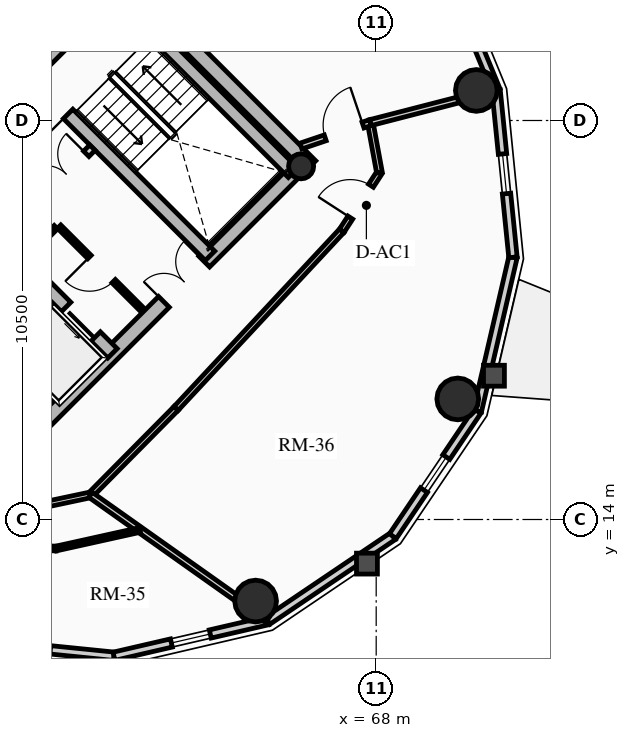
"""IFC4 building model, lengths in metres.
Left out: names, types, materials, properties, quantities, classifications, styles, units other than length and angle.
Written with IfcOpenShell. Run it as: python <this file> out.ifc"""

import sys

from ifc_helpers import new_model, si_unit, direction, frame, frame_2d, origin, origin_2d, place, context, subcontext, project, spatial, rectangle, circle, hollow_circle, extrude, source, transform, mapped, element, fill, save


model = new_model("IFC4")
c1 = context("Model", 3, precision=1e-05, world=origin(), true_north=direction((0.0, 1.0)))
c2 = subcontext(c1, "Body", "Model", "MODEL_VIEW")
j1 = project(units=[si_unit("LENGTHUNIT", "METRE"), si_unit("PLANEANGLEUNIT", "RADIAN")], contexts=[c1])
p1 = place(None, origin())
s1 = spatial("IfcSite", under=j1, at=p1, CompositionType="ELEMENT")
p2 = place(p1, origin())
s2 = spatial("IfcBuilding", under=s1, at=p2, CompositionType="ELEMENT")
p3 = place(p2, frame((0.0, 0.0, 222.85)))
s3 = spatial("IfcBuildingStorey", under=s2, at=p3, CompositionType="ELEMENT", Elevation=222.85)
p4 = place(p3, frame((66.268, 23.298, 0.0), z_axis=(0.0, 0.0, 1.0), x_axis=(-0.707106781187, 0.707106781187, 0.0)))
e1 = element("IfcWall", 1, at=p4, inside=s3, PredefinedType="SHEAR", context=c2, shape_type="SweptSolid", body=[
    extrude(rectangle(XDim=14.1, YDim=0.4, at=frame_2d((7.05, 0.0))), origin(), (0.0, 0.0, 1.0), 3.2),
])
p5 = place(p3, frame((58.561, 15.873, 0.0), z_axis=(0.0, 0.0, 1.0), x_axis=(0.707106781187, 0.707106781187, 0.0)))
e2 = element("IfcWall", 2, at=p5, inside=s3, PredefinedType="SHEAR", context=c2, shape_type="SweptSolid", body=[
    extrude(rectangle(XDim=10.7, YDim=0.4, at=frame_2d((5.35, 0.0))), origin(), (0.0, 0.0, 1.0), 3.2),
])
m1 = source(origin(), c2, "Body", "SweptSolid", [
    extrude(rectangle(XDim=1.5, YDim=2.02, at=frame_2d((0.75, 1.01))), frame((0.0, 0.21, 0.0), z_axis=(0.0, -1.0, 0.0), x_axis=(1.0, 0.0, 0.0)), (0.0, 0.0, 1.0), 0.42),
])
p6 = place(p5, frame((5.45, 0.0, 0.0)))
e3 = element("IfcOpeningElement", 3, at=p6, cuts=e2, PredefinedType="OPENING", context=c2, shape_type="MappedRepresentation", body=[
    mapped(m1, transform((0.0, 0.0, 0.0), x_axis=(1.0, 0.0, 0.0), y_axis=(0.0, 1.0, 0.0), z_axis=(0.0, 0.0, 1.0), scale=1.0)),
])
p7 = place(p3, frame((61.06, 18.373, 0.0), z_axis=(0.0, 0.0, 1.0), x_axis=(-0.707106781187, 0.707106781187, 0.0)))
e4 = element("IfcWall", 4, at=p7, inside=s3, PredefinedType="SHEAR", context=c2, shape_type="SweptSolid", body=[
    extrude(rectangle(XDim=13.7, YDim=0.35, at=frame_2d((6.85, 0.0))), origin(), (0.0, 0.0, 1.0), 3.2),
])
m2 = source(origin(), c2, "Body", "SweptSolid", [
    extrude(rectangle(XDim=1.1, YDim=2.015, at=frame_2d((0.55, 1.007))), frame((0.0, 0.185, 0.0), z_axis=(0.0, -1.0, 0.0), x_axis=(1.0, 0.0, 0.0)), (0.0, 0.0, 1.0), 0.37),
])
p8 = place(p7, frame((4.85, 0.0, 0.0)))
e5 = element("IfcOpeningElement", 5, at=p8, cuts=e4, PredefinedType="OPENING", context=c2, shape_type="MappedRepresentation", body=[
    mapped(m2, transform((0.0, 0.0, 0.0), x_axis=(1.0, 0.0, 0.0), y_axis=(0.0, 1.0, 0.0), z_axis=(0.0, 0.0, 1.0), scale=1.0)),
])
p9 = place(p7, frame((0.625, 0.0, 0.0)))
e6 = element("IfcOpeningElement", 6, at=p9, cuts=e4, PredefinedType="OPENING", context=c2, shape_type="MappedRepresentation", body=[
    mapped(m2, transform((0.0, 0.0, 0.0), x_axis=(1.0, 0.0, 0.0), y_axis=(0.0, 1.0, 0.0), z_axis=(0.0, 0.0, 1.0), scale=1.0)),
])
p10 = place(p7, frame((2.625, 0.0, 0.0)))
e7 = element("IfcOpeningElement", 7, at=p10, cuts=e4, PredefinedType="OPENING", context=c2, shape_type="MappedRepresentation", body=[
    mapped(m2, transform((0.0, 0.0, 0.0), x_axis=(1.0, 0.0, 0.0), y_axis=(0.0, 1.0, 0.0), z_axis=(0.0, 0.0, 1.0), scale=1.0)),
])
m3 = source(origin(), c2, "Body", "SweptSolid", [
    extrude(rectangle(XDim=1.15, YDim=2.02, at=frame_2d((0.575, 1.01))), frame((0.0, 0.185, 0.0), z_axis=(0.0, -1.0, 0.0), x_axis=(1.0, 0.0, 0.0)), (0.0, 0.0, 1.0), 0.37),
])
p11 = place(p7, frame((7.27, 0.0, 0.0)))
e8 = element("IfcOpeningElement", 8, at=p11, cuts=e4, PredefinedType="OPENING", context=c2, shape_type="MappedRepresentation", body=[
    mapped(m3, transform((0.0, 0.0, 0.0), x_axis=(1.0, 0.0, 0.0), y_axis=(0.0, 1.0, 0.0), z_axis=(0.0, 0.0, 1.0), scale=1.0)),
])
p12 = place(p3, frame((63.627, 20.94, 0.0), z_axis=(0.0, 0.0, 1.0), x_axis=(-0.707119496762, 0.707094065383, 0.0)))
e9 = element("IfcWall", 9, at=p12, inside=s3, PredefinedType="SHEAR", context=c2, shape_type="SweptSolid", body=[
    extrude(rectangle(XDim=9.6, YDim=0.35, at=frame_2d((4.8, 0.0))), origin(), (0.0, 0.0, 1.0), 3.2),
])
p13 = place(p12, frame((5.28, 0.0, 0.0)))
e10 = element("IfcOpeningElement", 10, at=p13, cuts=e9, PredefinedType="OPENING", context=c2, shape_type="MappedRepresentation", body=[
    mapped(m3, transform((0.0, 0.0, 0.0), x_axis=(1.0, 0.0, 0.0), y_axis=(0.0, 1.0, 0.0), z_axis=(0.0, 0.0, 1.0), scale=1.0)),
])
p14 = place(p3, frame((65.812, 23.125, 0.0), z_axis=(0.0, 0.0, 1.0), x_axis=(-0.707106781187, 0.707106781187, 0.0)))
e11 = element("IfcWall", 11, at=p14, inside=s3, PredefinedType="SHEAR", context=c2, shape_type="SweptSolid", body=[
    extrude(rectangle(XDim=6.695, YDim=0.35, at=frame_2d((3.348, 0.0))), origin(), (0.0, 0.0, 1.0), 3.2),
])
p15 = place(p3, frame((58.893, 25.674, 0.0), z_axis=(0.0, 0.0, 1.0), x_axis=(0.707106781187, 0.707106781187, 0.0)))
e12 = element("IfcWall", 12, at=p15, inside=s3, PredefinedType="SHEAR", context=c2, shape_type="SweptSolid", body=[
    extrude(rectangle(XDim=3.285, YDim=0.35, at=frame_2d((1.643, 0.0))), origin(), (0.0, 0.0, 1.0), 3.2),
])
p16 = place(p3, frame((66.024, 23.294, 0.0), z_axis=(0.0, 0.0, 1.0), x_axis=(0.707106781187, 0.707106781187, 0.0)))
e13 = element("IfcColumn", 13, at=p16, inside=s3, PredefinedType="COLUMN", context=c2, shape_type="SweptSolid", body=[
    extrude(hollow_circle(Radius=0.33, WallThickness=0.025, at=origin_2d()), origin(), (0.0, 0.0, 1.0), 3.2),
])
for number, where, z_axis, x_axis in (
    (14, (64.827, 11.854, 0.0), (0.0, 0.0, 1.0), (1.0, 0.0, 0.0)),
    (15, (70.146, 17.173, 0.0), (0.0, 0.0, 1.0), (1.0, 0.0, 0.0)),
    (16, (70.635, 25.291, 0.0), (0.0, 0.0, 1.0), (1.0, 0.0, 0.0)),
):
    element("IfcColumn", number, at=place(p3, frame(where, z_axis=z_axis, x_axis=x_axis)), inside=s3, PredefinedType="USERDEFINED", context=c2, shape_type="SweptSolid", body=[
        extrude(circle(Radius=0.55, at=origin_2d()), origin(), (0.0, 0.0, 1.0), 3.2),
    ])
p17 = place(p3, frame((61.1, 10.401, 0.0), z_axis=(0.0, 0.0, 1.0), x_axis=(-0.994929930991, 0.100570534541, 0.0)))
e17 = element("IfcWall", 17, at=p17, inside=s3, PredefinedType="SOLIDWALL", context=c2, shape_type="SweptSolid", body=[
    extrude(rectangle(XDim=4.418, YDim=0.22, at=frame_2d((2.209, 0.0))), origin(), (0.0, 0.0, 1.0), 2.612),
])
m4 = source(origin(), c2, "Body", "SweptSolid", [
    extrude(rectangle(XDim=1.05, YDim=1.3, at=frame_2d((0.525, 0.65))), frame((0.0, 0.12, 0.0), z_axis=(0.0, -1.0, 0.0), x_axis=(1.0, 0.0, 0.0)), (0.0, 0.0, 1.0), 0.24),
])
p18 = place(p17, frame((1.684, 0.0, 0.65)))
e18 = element("IfcOpeningElement", 18, at=p18, cuts=e17, PredefinedType="OPENING", context=c2, shape_type="MappedRepresentation", body=[
    mapped(m4, transform((0.0, 0.0, 0.0), x_axis=(1.0, 0.0, 0.0), y_axis=(0.0, 1.0, 0.0), z_axis=(0.0, 0.0, 1.0), scale=1.0)),
])
p19 = place(p3, frame((65.144, 11.337, 0.0), z_axis=(0.0, 0.0, 1.0), x_axis=(-0.974249228678, -0.225473813158, 0.0)))
e19 = element("IfcWall", 19, at=p19, inside=s3, PredefinedType="SOLIDWALL", context=c2, shape_type="SweptSolid", body=[
    extrude(rectangle(XDim=4.15, YDim=0.22, at=frame_2d((2.075, 0.0))), origin(), (0.0, 0.0, 1.0), 2.612),
])
p20 = place(p19, frame((1.55, 0.0, 0.65)))
e20 = element("IfcOpeningElement", 20, at=p20, cuts=e19, PredefinedType="OPENING", context=c2, shape_type="MappedRepresentation", body=[
    mapped(m4, transform((0.0, 0.0, 0.0), x_axis=(1.0, 0.0, 0.0), y_axis=(0.0, 1.0, 0.0), z_axis=(0.0, 0.0, 1.0), scale=1.0)),
])
p21 = place(p3, frame((68.439, 13.561, 0.0), z_axis=(0.0, 0.0, 1.0), x_axis=(-0.828833723692, -0.559495003079, 0.0)))
e21 = element("IfcWall", 21, at=p21, inside=s3, PredefinedType="SOLIDWALL", context=c2, shape_type="SweptSolid", body=[
    extrude(rectangle(XDim=3.976, YDim=0.22, at=frame_2d((1.988, 0.0))), origin(), (0.0, 0.0, 1.0), 2.612),
])
p22 = place(p3, frame((70.663, 16.856, 0.0), z_axis=(0.0, 0.0, 1.0), x_axis=(-0.559495003079, -0.828833723692, 0.0)))
e22 = element("IfcWall", 22, at=p22, inside=s3, PredefinedType="SOLIDWALL", context=c2, shape_type="SweptSolid", body=[
    extrude(rectangle(XDim=3.976, YDim=0.22, at=frame_2d((1.988, 0.0))), origin(), (0.0, 0.0, 1.0), 2.612),
])
p23 = place(p22, frame((1.463, 0.0, 0.65)))
e23 = element("IfcOpeningElement", 23, at=p23, cuts=e22, PredefinedType="OPENING", context=c2, shape_type="MappedRepresentation", body=[
    mapped(m4, transform((0.0, 0.0, 0.0), x_axis=(1.0, 0.0, 0.0), y_axis=(0.0, 1.0, 0.0), z_axis=(0.0, 0.0, 1.0), scale=1.0)),
])
p24 = place(p3, frame((71.599, 20.9, 0.0), z_axis=(0.0, 0.0, 1.0), x_axis=(-0.225473813158, -0.974249228678, 0.0)))
e24 = element("IfcWall", 24, at=p24, inside=s3, PredefinedType="SOLIDWALL", context=c2, shape_type="SweptSolid", body=[
    extrude(rectangle(XDim=4.15, YDim=0.22, at=frame_2d((2.075, 0.0))), origin(), (0.0, 0.0, 1.0), 2.612),
])
p25 = place(p3, frame((71.155, 25.295, 0.0), z_axis=(0.0, 0.0, 1.0), x_axis=(0.100570534541, -0.994929930991, 0.0)))
e25 = element("IfcWall", 25, at=p25, inside=s3, PredefinedType="SOLIDWALL", context=c2, shape_type="SweptSolid", body=[
    extrude(rectangle(XDim=4.418, YDim=0.22, at=frame_2d((2.209, 0.0))), origin(), (0.0, 0.0, 1.0), 2.612),
])
p26 = place(p25, frame((1.684, 0.0, 0.65)))
e26 = element("IfcOpeningElement", 26, at=p26, cuts=e25, PredefinedType="OPENING", context=c2, shape_type="MappedRepresentation", body=[
    mapped(m4, transform((0.0, 0.0, 0.0), x_axis=(1.0, 0.0, 0.0), y_axis=(0.0, 1.0, 0.0), z_axis=(0.0, 0.0, 1.0), scale=1.0)),
])
p27 = place(p3, frame((69.374, 29.613, 0.0), z_axis=(0.0, 0.0, 1.0), x_axis=(0.381309704956, -0.924447353237, 0.0)))
e27 = element("IfcWall", 27, at=p27, inside=s3, PredefinedType="SOLIDWALL", context=c2, shape_type="SweptSolid", body=[
    extrude(rectangle(XDim=4.671, YDim=0.22, at=frame_2d((2.335, 0.0))), origin(), (0.0, 0.0, 1.0), 2.612),
])
p28 = place(p3, frame((58.214, 21.467, 0.0), z_axis=(0.0, 0.0, 1.0), x_axis=(0.707106781187, 0.707106781187, 0.0)))
e28 = element("IfcWall", 28, at=p28, inside=s3, PredefinedType="PARTITIONING", context=c2, shape_type="SweptSolid", body=[
    extrude(rectangle(XDim=3.28, YDim=0.2, at=frame_2d((1.64, 0.0))), origin(), (0.0, 0.0, 1.0), 2.975),
])
m5 = source(origin(), c2, "Body", "SweptSolid", [
    extrude(rectangle(XDim=1.5, YDim=2.02, at=frame_2d((0.75, 1.01))), frame((0.0, 0.11, 0.0), z_axis=(0.0, -1.0, 0.0), x_axis=(1.0, 0.0, 0.0)), (0.0, 0.0, 1.0), 0.22),
])
p29 = place(p28, frame((1.55, 0.0, 0.0)))
e29 = element("IfcOpeningElement", 29, at=p29, cuts=e28, PredefinedType="OPENING", context=c2, shape_type="MappedRepresentation", body=[
    mapped(m5, transform((0.0, 0.0, 0.0), x_axis=(1.0, 0.0, 0.0), y_axis=(0.0, 1.0, 0.0), z_axis=(0.0, 0.0, 1.0), scale=1.0)),
])
p30 = place(p3, frame((61.835, 19.529, 0.0), z_axis=(0.0, 0.0, 1.0), x_axis=(-0.707146413884, 0.707067146267, 0.0)))
e30 = element("IfcWall", 30, at=p30, inside=s3, PredefinedType="PARTITIONING", context=c2, shape_type="SweptSolid", body=[
    extrude(rectangle(XDim=3.08, YDim=0.125, at=frame_2d((1.54, 0.0))), origin(), (0.0, 0.0, 1.0), 2.975),
])
m6 = source(origin(), c2, "Body", "SweptSolid", [
    extrude(rectangle(XDim=0.9, YDim=2.005, at=frame_2d((0.45, 1.002))), frame((0.0, 0.073, 0.0), z_axis=(0.0, -1.0, 0.0), x_axis=(1.0, 0.0, 0.0)), (0.0, 0.0, 1.0), 0.145),
])
p31 = place(p30, frame((1.05, 0.0, 0.0)))
e31 = element("IfcOpeningElement", 31, at=p31, cuts=e30, PredefinedType="OPENING", context=c2, shape_type="MappedRepresentation", body=[
    mapped(m6, transform((0.0, 0.0, 0.0), x_axis=(1.0, 0.0, 0.0), y_axis=(0.0, 1.0, 0.0), z_axis=(0.0, 0.0, 1.0), scale=1.0)),
])
p32 = place(p3, frame((58.794, 20.915, 0.0), z_axis=(0.0, 0.0, 1.0), x_axis=(0.707106781187, 0.707106781187, 0.0)))
e32 = element("IfcWall", 32, at=p32, inside=s3, PredefinedType="PARTITIONING", context=c2, shape_type="SweptSolid", body=[
    extrude(rectangle(XDim=1.1, YDim=0.125, at=frame_2d((0.55, 0.0))), origin(), (0.0, 0.0, 1.0), 2.975),
])
p33 = place(p3, frame((58.983, 14.331, 0.0), z_axis=(0.0, 0.0, 1.0), x_axis=(0.978328007546, 0.207061125397, 0.0)))
e33 = element("IfcWall", 33, at=p33, inside=s3, PredefinedType="PARTITIONING", context=c2, shape_type="SweptSolid", body=[
    extrude(rectangle(XDim=1.534, YDim=0.15, at=frame_2d((0.767, 0.0))), origin(), (0.0, 0.0, 1.0), 2.545),
])
p34 = place(p3, frame((60.484, 14.648, 0.0), z_axis=(0.0, 0.0, 1.0), x_axis=(0.703398221944, 0.710795991383, 0.0)))
e34 = element("IfcWall", 34, at=p34, inside=s3, PredefinedType="PARTITIONING", context=c2, shape_type="SweptSolid", body=[
    extrude(rectangle(XDim=3.201, YDim=0.15, at=frame_2d((1.601, 0.0))), origin(), (0.0, 0.0, 1.0), 2.612),
])
p35 = place(p3, frame((62.736, 16.924, 0.0), z_axis=(0.0, 0.0, 1.0), x_axis=(0.681946700833, 0.731401871219, 0.0)))
e35 = element("IfcWall", 35, at=p35, inside=s3, PredefinedType="PARTITIONING", context=c2, shape_type="SweptSolid", body=[
    extrude(rectangle(XDim=6.393, YDim=0.15, at=frame_2d((3.196, 0.0))), origin(), (0.0, 0.0, 1.0), 2.545),
])
p36 = place(p3, frame((67.095, 21.6, 0.0), z_axis=(0.0, 0.0, 1.0), x_axis=(0.543773190184, 0.839232219137, 0.0)))
e36 = element("IfcWall", 36, at=p36, inside=s3, PredefinedType="PARTITIONING", context=c2, shape_type="SweptSolid", body=[
    extrude(rectangle(XDim=1.823, YDim=0.15, at=frame_2d((0.911, 0.0))), origin(), (0.0, 0.0, 1.0), 2.545),
])
m7 = source(origin(), c2, "Body", "SweptSolid", [
    extrude(rectangle(XDim=1.0, YDim=2.015, at=frame_2d((0.5, 1.007))), frame((0.0, 0.085, 0.0), z_axis=(0.0, -1.0, 0.0), x_axis=(1.0, 0.0, 0.0)), (0.0, 0.0, 1.0), 0.17),
])
p37 = place(p36, frame((0.412, 0.0, 0.0)))
e37 = element("IfcOpeningElement", 37, at=p37, cuts=e36, PredefinedType="OPENING", context=c2, shape_type="MappedRepresentation", body=[
    mapped(m7, transform((0.0, 0.0, 0.0), x_axis=(1.0, 0.0, 0.0), y_axis=(0.0, 1.0, 0.0), z_axis=(0.0, 0.0, 1.0), scale=1.0)),
])
p38 = place(p3, frame((68.086, 23.129, 0.0), z_axis=(0.0, 0.0, 1.0), x_axis=(-0.182004193146, 0.983297754334, 0.0)))
e38 = element("IfcWall", 38, at=p38, inside=s3, PredefinedType="PARTITIONING", context=c2, shape_type="SweptSolid", body=[
    extrude(rectangle(XDim=1.336, YDim=0.15, at=frame_2d((0.668, 0.0))), origin(), (0.0, 0.0, 1.0), 2.612),
])
p39 = place(p3, frame((60.484, 14.648, 0.0), z_axis=(0.0, 0.0, 1.0), x_axis=(0.81605983932, -0.577967420058, 0.0)))
e39 = element("IfcWall", 39, at=p39, inside=s3, PredefinedType="PARTITIONING", context=c2, shape_type="SweptSolid", body=[
    extrude(rectangle(XDim=5.699, YDim=0.16, at=frame_2d((2.85, 0.0))), origin(), (0.0, 0.0, 1.0), 2.612),
])
p40 = place(p3, frame((67.843, 24.443, 0.0), z_axis=(0.0, 0.0, 1.0), x_axis=(0.968303102463, 0.249778105048, 0.0)))
e40 = element("IfcWall", 40, at=p40, inside=s3, PredefinedType="PARTITIONING", context=c2, shape_type="SweptSolid", body=[
    extrude(rectangle(XDim=3.399, YDim=0.16, at=frame_2d((1.7, 0.0))), origin(), (0.0, 0.0, 1.0), 2.612),
])
p41 = place(p3, frame((66.021, 23.828, 0.0), z_axis=(0.0, 0.0, 1.0), x_axis=(0.947522075691, 0.319690344049, 0.0)))
e41 = element("IfcWall", 41, at=p41, inside=s3, PredefinedType="PARTITIONING", context=c2, shape_type="SweptSolid", body=[
    extrude(rectangle(XDim=1.924, YDim=0.16, at=frame_2d((0.962, 0.0))), origin(), (0.0, 0.0, 1.0), 2.545),
])
m8 = source(origin(), c2, "Body", "SweptSolid", [
    extrude(rectangle(XDim=1.05, YDim=2.015, at=frame_2d((0.525, 1.007))), frame((0.0, 0.09, 0.0), z_axis=(0.0, -1.0, 0.0), x_axis=(1.0, 0.0, 0.0)), (0.0, 0.0, 1.0), 0.18),
])
p42 = place(p41, frame((0.674, 0.0, 0.0)))
e42 = element("IfcOpeningElement", 42, at=p42, cuts=e41, PredefinedType="OPENING", context=c2, shape_type="MappedRepresentation", body=[
    mapped(m8, transform((0.0, 0.0, 0.0), x_axis=(1.0, 0.0, 0.0), y_axis=(0.0, 1.0, 0.0), z_axis=(0.0, 0.0, 1.0), scale=1.0)),
])
p43 = place(p3, frame((57.306, 13.312, 0.0), z_axis=(0.0, 0.0, 1.0), x_axis=(0.999437122872, -0.033547539789, 0.0)))
e43 = element("IfcWall", 43, at=p43, inside=s3, PredefinedType="PARTITIONING", context=c2, shape_type="SweptSolid", body=[
    extrude(rectangle(XDim=2.271, YDim=0.125, at=frame_2d((1.135, 0.0))), origin(), (0.0, 0.0, 1.0), 2.612),
])
p44 = place(p3, frame((59.575, 13.236, 0.0), z_axis=(0.0, 0.0, 1.0), x_axis=(0.97628336492, 0.216496631337, 0.0)))
e44 = element("IfcWall", 44, at=p44, inside=s3, PredefinedType="PARTITIONING", context=c2, shape_type="SweptSolid", body=[
    extrude(rectangle(XDim=2.264, YDim=0.125, at=frame_2d((1.132, 0.0))), origin(), (0.0, 0.0, 1.0), 2.545),
])
m9 = source(origin(), c2, "Body", "SweptSolid", [
    extrude(rectangle(XDim=1.05, YDim=1.3, at=frame_2d((0.525, 0.65))), frame((0.0, 0.03, 0.0), z_axis=(0.0, -1.0, 0.0), x_axis=(1.0, 0.0, 0.0)), (0.0, 0.0, 1.0), 0.06),
])
p45 = place(p20, origin())
e45 = element("IfcWindow", 45, at=p45, inside=s3, PartitioningType="SINGLE_PANEL", PredefinedType="WINDOW", context=c2, shape_type="MappedRepresentation", body=[
    mapped(m9, transform((0.0, 0.0, 0.0), x_axis=(1.0, 0.0, 0.0), y_axis=(0.0, 1.0, 0.0), z_axis=(0.0, 0.0, 1.0), scale=1.0)),
])
fill(e20, e45)
p46 = place(p23, origin())
e46 = element("IfcWindow", 46, at=p46, inside=s3, PartitioningType="SINGLE_PANEL", PredefinedType="WINDOW", context=c2, shape_type="MappedRepresentation", body=[
    mapped(m9, transform((0.0, 0.0, 0.0), x_axis=(1.0, 0.0, 0.0), y_axis=(0.0, 1.0, 0.0), z_axis=(0.0, 0.0, 1.0), scale=1.0)),
])
fill(e23, e46)
p47 = place(p26, origin())
e47 = element("IfcWindow", 47, at=p47, inside=s3, PartitioningType="SINGLE_PANEL", PredefinedType="WINDOW", context=c2, shape_type="MappedRepresentation", body=[
    mapped(m9, transform((0.0, 0.0, 0.0), x_axis=(1.0, 0.0, 0.0), y_axis=(0.0, 1.0, 0.0), z_axis=(0.0, 0.0, 1.0), scale=1.0)),
])
fill(e26, e47)
m10 = source(origin(), c2, "Body", "SweptSolid", [
    extrude(rectangle(XDim=1.1, YDim=2.015, at=frame_2d((0.55, 1.007))), frame((0.0, 0.025, 0.0), z_axis=(0.0, -1.0, 0.0), x_axis=(1.0, 0.0, 0.0)), (0.0, 0.0, 1.0), 0.05),
])
p48 = place(p9, origin())
e48 = element("IfcDoor", 48, at=p48, inside=s3, OperationType="SLIDING_TO_LEFT", PredefinedType="DOOR", context=c2, shape_type="MappedRepresentation", body=[
    mapped(m10, transform((0.0, 0.0, 0.0), x_axis=(1.0, 0.0, 0.0), y_axis=(0.0, 1.0, 0.0), z_axis=(0.0, 0.0, 1.0), scale=1.0)),
])
fill(e6, e48)
m11 = source(origin(), c2, "Body", "SweptSolid", [
    extrude(rectangle(XDim=1.15, YDim=2.02, at=frame_2d((0.575, 1.01))), frame((0.0, 0.025, 0.0), z_axis=(0.0, -1.0, 0.0), x_axis=(1.0, 0.0, 0.0)), (0.0, 0.0, 1.0), 0.05),
])
p49 = place(p13, origin())
e49 = element("IfcDoor", 49, at=p49, inside=s3, OperationType="SINGLE_SWING_LEFT", PredefinedType="DOOR", context=c2, shape_type="MappedRepresentation", body=[
    mapped(m11, transform((0.0, 0.0, 0.0), x_axis=(1.0, 0.0, 0.0), y_axis=(0.0, 1.0, 0.0), z_axis=(0.0, 0.0, 1.0), scale=1.0)),
])
fill(e10, e49)
m12 = source(origin(), c2, "Body", "SweptSolid", [
    extrude(rectangle(XDim=1.5, YDim=2.02, at=frame_2d((0.75, 1.01))), frame((0.0, 0.025, 0.0), z_axis=(0.0, -1.0, 0.0), x_axis=(1.0, 0.0, 0.0)), (0.0, 0.0, 1.0), 0.05),
])
p50 = place(p6, origin())
e50 = element("IfcDoor", 50, at=p50, inside=s3, OperationType="DOUBLE_DOOR_SINGLE_SWING", PredefinedType="DOOR", context=c2, shape_type="MappedRepresentation", body=[
    mapped(m12, transform((0.0, 0.0, 0.0), x_axis=(1.0, 0.0, 0.0), y_axis=(0.0, 1.0, 0.0), z_axis=(0.0, 0.0, 1.0), scale=1.0)),
])
fill(e3, e50)
p51 = place(p29, origin())
e51 = element("IfcDoor", 51, at=p51, inside=s3, OperationType="DOUBLE_DOOR_SINGLE_SWING", PredefinedType="DOOR", context=c2, shape_type="MappedRepresentation", body=[
    mapped(m12, transform((0.0, 0.0, 0.0), x_axis=(1.0, 0.0, 0.0), y_axis=(0.0, 1.0, 0.0), z_axis=(0.0, 0.0, 1.0), scale=1.0)),
])
fill(e29, e51)
m13 = source(origin(), c2, "Body", "SweptSolid", [
    extrude(rectangle(XDim=0.9, YDim=2.005, at=frame_2d((0.45, 1.002))), frame((0.0, 0.025, 0.0), z_axis=(0.0, -1.0, 0.0), x_axis=(1.0, 0.0, 0.0)), (0.0, 0.0, 1.0), 0.05),
])
p52 = place(p31, origin())
e52 = element("IfcDoor", 52, at=p52, inside=s3, OperationType="SINGLE_SWING_RIGHT", PredefinedType="DOOR", context=c2, shape_type="MappedRepresentation", body=[
    mapped(m13, transform((0.0, 0.0, 0.0), x_axis=(1.0, 0.0, 0.0), y_axis=(0.0, 1.0, 0.0), z_axis=(0.0, 0.0, 1.0), scale=1.0)),
])
fill(e31, e52)
m14 = source(origin(), c2, "Body", "SweptSolid", [
    extrude(rectangle(XDim=1.05, YDim=2.015, at=frame_2d((0.525, 1.007))), frame((0.0, 0.025, 0.0), z_axis=(0.0, -1.0, 0.0), x_axis=(1.0, 0.0, 0.0)), (0.0, 0.0, 1.0), 0.05),
])
p53 = place(p42, origin())
e53 = element("IfcDoor", 53, at=p53, inside=s3, OperationType="SINGLE_SWING_RIGHT", PredefinedType="DOOR", context=c2, shape_type="MappedRepresentation", body=[
    mapped(m14, transform((0.0, 0.0, 0.0), x_axis=(1.0, 0.0, 0.0), y_axis=(0.0, 1.0, 0.0), z_axis=(0.0, 0.0, 1.0), scale=1.0)),
])
fill(e42, e53)
m15 = source(origin(), c2, "Body", "SweptSolid", [
    extrude(rectangle(XDim=1.0, YDim=2.015, at=frame_2d((0.5, 1.007))), frame((0.0, 0.025, 0.0), z_axis=(0.0, -1.0, 0.0), x_axis=(1.0, 0.0, 0.0)), (0.0, 0.0, 1.0), 0.05),
])
p54 = place(p37, origin())
e54 = element("IfcDoor", 54, at=p54, inside=s3, OperationType="SINGLE_SWING_LEFT", PredefinedType="DOOR", context=c2, shape_type="MappedRepresentation", body=[
    mapped(m15, transform((0.0, 0.0, 0.0), x_axis=(1.0, 0.0, 0.0), y_axis=(0.0, 1.0, 0.0), z_axis=(0.0, 0.0, 1.0), scale=1.0)),
])
fill(e37, e54)
save(model, sys.argv[1])
